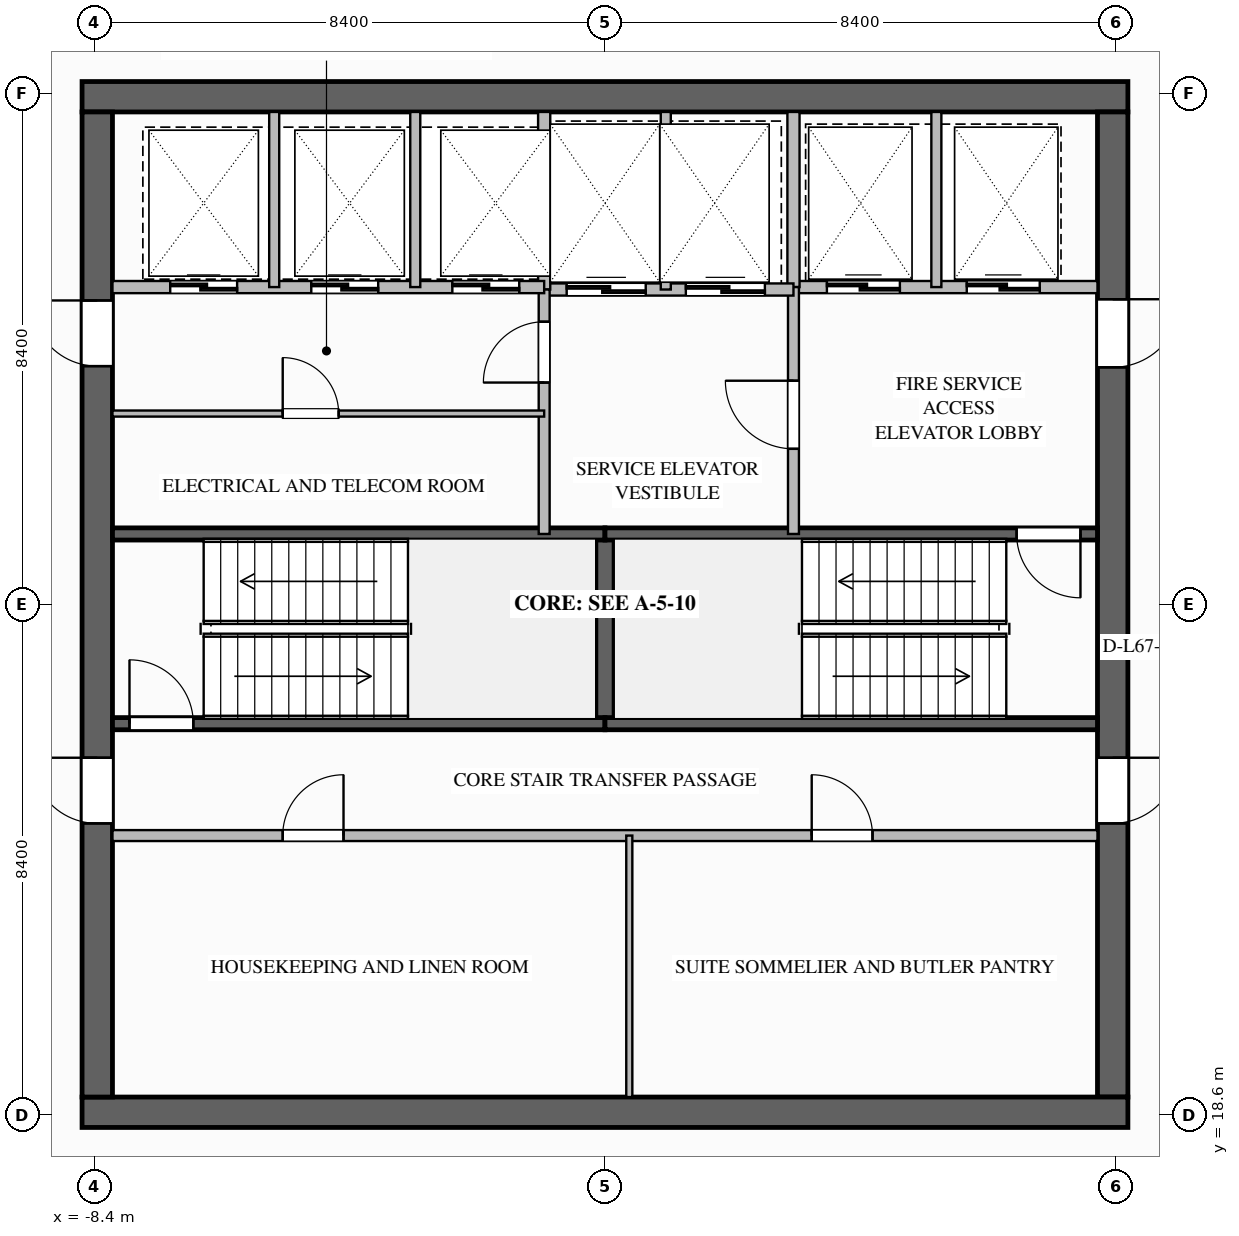
"""IFC4 building model, lengths in metres.
Left out: names, types, materials, properties, quantities, classifications, styles, units other than length and angle.
Written with IfcOpenShell. Run it as: python <this file> out.ifc"""

import sys

from ifc_helpers import new_model, si_unit, direction, frame, frame_2d, origin, place, context, subcontext, project, spatial, rectangle, extrude, element, fill, save


model = new_model("IFC4")
c1 = context("Model", 3, precision=1e-05, world=origin(), true_north=direction((0.0, 1.0)))
c2 = subcontext(c1, "Body", "Model", "MODEL_VIEW")
j1 = project(units=[si_unit("LENGTHUNIT", "METRE"), si_unit("PLANEANGLEUNIT", "RADIAN")], contexts=[c1])
p1 = place(None, origin())
s1 = spatial("IfcSite", under=j1, at=p1, CompositionType="ELEMENT")
p2 = place(p1, origin())
s2 = spatial("IfcBuilding", under=s1, at=p2, CompositionType="ELEMENT")
p3 = place(p2, frame((0.0, 0.0, 255.5)))
s3 = spatial("IfcBuildingStorey", under=s2, at=p3, CompositionType="ELEMENT", Elevation=255.5)
p4 = place(p3, frame((-8.6, 35.35, 0.0), z_axis=(0.0, 0.0, 1.0), x_axis=(1.0, 0.0, 0.0)))
e1 = element("IfcWall", 1, at=p4, inside=s3, PredefinedType="SHEAR", context=c2, shape_type="SweptSolid", body=[
    extrude(rectangle(XDim=17.2, YDim=0.5, at=frame_2d((8.6, 0.0))), origin(), (0.0, 0.0, 1.0), 4.5),
])
p5 = place(p3, frame((8.35, 35.1, 0.0), z_axis=(0.0, 0.0, 1.0), x_axis=(0.0, -1.0, 0.0)))
e2 = element("IfcWall", 2, at=p5, inside=s3, PredefinedType="SHEAR", context=c2, shape_type="SweptSolid", body=[
    extrude(rectangle(XDim=16.2, YDim=0.5, at=frame_2d((8.1, 0.0))), origin(), (0.0, 0.0, 1.0), 4.5),
])
p6 = place(p5, frame((3.08, 0.0, 0.0)))
e3 = element("IfcOpeningElement", 3, at=p6, cuts=e2, PredefinedType="OPENING", context=c2, shape_type="SweptSolid", body=[
    extrude(rectangle(XDim=1.12, YDim=2.1, at=frame_2d((0.56, 1.05))), frame((0.0, 0.26, 0.0), z_axis=(0.0, -1.0, 0.0), x_axis=(1.0, 0.0, 0.0)), (0.0, 0.0, 1.0), 0.52),
])
p7 = place(p5, frame((10.62, 0.0, 0.0)))
e4 = element("IfcOpeningElement", 4, at=p7, cuts=e2, PredefinedType="OPENING", context=c2, shape_type="SweptSolid", body=[
    extrude(rectangle(XDim=1.08, YDim=2.04, at=frame_2d((0.54, 1.02))), frame((0.0, 0.26, 0.0), z_axis=(0.0, -1.0, 0.0), x_axis=(1.0, 0.0, 0.0)), (0.0, 0.0, 1.0), 0.52),
])
p8 = place(p3, frame((8.6, 18.65, 0.0), z_axis=(0.0, 0.0, 1.0), x_axis=(-1.0, 0.0, 0.0)))
e5 = element("IfcWall", 5, at=p8, inside=s3, PredefinedType="SHEAR", context=c2, shape_type="SweptSolid", body=[
    extrude(rectangle(XDim=17.2, YDim=0.5, at=frame_2d((8.6, 0.0))), origin(), (0.0, 0.0, 1.0), 4.5),
])
p9 = place(p3, frame((-8.35, 18.9, 0.0), z_axis=(0.0, 0.0, 1.0), x_axis=(0.0, 1.0, 0.0)))
e6 = element("IfcWall", 6, at=p9, inside=s3, PredefinedType="SHEAR", context=c2, shape_type="SweptSolid", body=[
    extrude(rectangle(XDim=16.2, YDim=0.5, at=frame_2d((8.1, 0.0))), origin(), (0.0, 0.0, 1.0), 4.5),
])
p10 = place(p9, frame((12.02, 0.0, 0.0)))
e7 = element("IfcOpeningElement", 7, at=p10, cuts=e6, PredefinedType="OPENING", context=c2, shape_type="SweptSolid", body=[
    extrude(rectangle(XDim=1.08, YDim=2.04, at=frame_2d((0.54, 1.02))), frame((0.0, 0.26, 0.0), z_axis=(0.0, -1.0, 0.0), x_axis=(1.0, 0.0, 0.0)), (0.0, 0.0, 1.0), 0.52),
])
p11 = place(p9, frame((4.5, 0.0, 0.0)))
e8 = element("IfcOpeningElement", 8, at=p11, cuts=e6, PredefinedType="OPENING", context=c2, shape_type="SweptSolid", body=[
    extrude(rectangle(XDim=1.08, YDim=2.04, at=frame_2d((0.54, 1.02))), frame((0.0, 0.26, 0.0), z_axis=(0.0, -1.0, 0.0), x_axis=(1.0, 0.0, 0.0)), (0.0, 0.0, 1.0), 0.52),
])
p12 = place(p3, frame((0.0, 25.04, 0.0), z_axis=(0.0, 0.0, 1.0), x_axis=(0.0, 1.0, 0.0)))
e9 = element("IfcWall", 9, at=p12, inside=s3, PredefinedType="SOLIDWALL", context=c2, shape_type="SweptSolid", body=[
    extrude(rectangle(XDim=3.12, YDim=0.3, at=frame_2d((1.56, 0.0))), origin(), (0.0, 0.0, 1.0), 4.18),
])
p13 = place(p3, frame((-8.1, 25.04, 0.0), z_axis=(0.0, 0.0, 1.0), x_axis=(1.0, 0.0, 0.0)))
e10 = element("IfcWall", 10, at=p13, inside=s3, PredefinedType="SOLIDWALL", context=c2, shape_type="SweptSolid", body=[
    extrude(rectangle(XDim=8.1, YDim=0.2, at=frame_2d((4.05, 0.0))), origin(), (0.0, 0.0, 1.0), 4.18),
])
p14 = place(p13, frame((0.28, 0.0, 0.0)))
e11 = element("IfcOpeningElement", 11, at=p14, cuts=e10, PredefinedType="OPENING", context=c2, shape_type="SweptSolid", body=[
    extrude(rectangle(XDim=1.05, YDim=2.1, at=frame_2d((0.525, 1.05))), frame((0.0, 0.11, 0.0), z_axis=(0.0, -1.0, 0.0), x_axis=(1.0, 0.0, 0.0)), (0.0, 0.0, 1.0), 0.22),
])
for number, where, z_axis, x_axis in (
    (12, (-8.1, 28.16, 0.0), (0.0, 0.0, 1.0), (1.0, 0.0, 0.0)),
    (13, (0.0, 25.04, 0.0), (0.0, 0.0, 1.0), (1.0, 0.0, 0.0)),
):
    element("IfcWall", number, at=place(p3, frame(where, z_axis=z_axis, x_axis=x_axis)), inside=s3, PredefinedType="SOLIDWALL", context=c2, shape_type="SweptSolid", body=[
        extrude(rectangle(XDim=8.1, YDim=0.2, at=frame_2d((4.05, 0.0))), origin(), (0.0, 0.0, 1.0), 4.18),
    ])
p15 = place(p3, frame((8.1, 28.16, 0.0), z_axis=(0.0, 0.0, 1.0), x_axis=(-1.0, 0.0, 0.0)))
e14 = element("IfcWall", 14, at=p15, inside=s3, PredefinedType="SOLIDWALL", context=c2, shape_type="SweptSolid", body=[
    extrude(rectangle(XDim=8.1, YDim=0.2, at=frame_2d((4.05, 0.0))), origin(), (0.0, 0.0, 1.0), 4.18),
])
p16 = place(p15, frame((0.28, 0.0, 0.0)))
e15 = element("IfcOpeningElement", 15, at=p16, cuts=e14, PredefinedType="OPENING", context=c2, shape_type="SweptSolid", body=[
    extrude(rectangle(XDim=1.05, YDim=2.1, at=frame_2d((0.525, 1.05))), frame((0.0, 0.11, 0.0), z_axis=(0.0, -1.0, 0.0), x_axis=(1.0, 0.0, 0.0)), (0.0, 0.0, 1.0), 0.22),
])
p17 = place(p3, frame((3.1, 32.22, 0.0), z_axis=(0.0, 0.0, 1.0), x_axis=(1.0, 0.0, 0.0)))
e16 = element("IfcWall", 16, at=p17, inside=s3, PredefinedType="SOLIDWALL", context=c2, shape_type="SweptSolid", body=[
    extrude(rectangle(XDim=5.0, YDim=0.2, at=frame_2d((2.5, 0.0))), origin(), (0.0, 0.0, 1.0), 4.18),
])
p18 = place(p17, frame((0.55, 0.0, 0.0)))
e17 = element("IfcOpeningElement", 17, at=p18, cuts=e16, PredefinedType="OPENING", context=c2, shape_type="SweptSolid", body=[
    extrude(rectangle(XDim=1.2, YDim=2.2, at=frame_2d((0.6, 1.1))), frame((0.0, 0.11, 0.0), z_axis=(0.0, -1.0, 0.0), x_axis=(1.0, 0.0, 0.0)), (0.0, 0.0, 1.0), 0.22),
])
p19 = place(p17, frame((2.85, 0.0, 0.0)))
e18 = element("IfcOpeningElement", 18, at=p19, cuts=e16, PredefinedType="OPENING", context=c2, shape_type="SweptSolid", body=[
    extrude(rectangle(XDim=1.2, YDim=2.2, at=frame_2d((0.6, 1.1))), frame((0.0, 0.11, 0.0), z_axis=(0.0, -1.0, 0.0), x_axis=(1.0, 0.0, 0.0)), (0.0, 0.0, 1.0), 0.22),
])
p20 = place(p3, frame((3.1, 32.22, 0.0), z_axis=(0.0, 0.0, 1.0), x_axis=(0.0, 1.0, 0.0)))
e19 = element("IfcWall", 19, at=p20, inside=s3, PredefinedType="SOLIDWALL", context=c2, shape_type="SweptSolid", body=[
    extrude(rectangle(XDim=2.88, YDim=0.2, at=frame_2d((1.44, 0.0))), origin(), (0.0, 0.0, 1.0), 4.18),
])
p21 = place(p3, frame((5.45, 32.22, 0.0), z_axis=(0.0, 0.0, 1.0), x_axis=(0.0, 1.0, 0.0)))
e20 = element("IfcWall", 20, at=p21, inside=s3, PredefinedType="PARTITIONING", context=c2, shape_type="SweptSolid", body=[
    extrude(rectangle(XDim=2.88, YDim=0.165, at=frame_2d((1.44, 0.0))), origin(), (0.0, 0.0, 1.0), 4.18),
])
p22 = place(p3, frame((3.1, 28.16, 0.0), z_axis=(0.0, 0.0, 1.0), x_axis=(0.0, 1.0, 0.0)))
e21 = element("IfcWall", 21, at=p22, inside=s3, PredefinedType="SOLIDWALL", context=c2, shape_type="SweptSolid", body=[
    extrude(rectangle(XDim=4.06, YDim=0.18, at=frame_2d((2.03, 0.0))), origin(), (0.0, 0.0, 1.0), 4.18),
])
p23 = place(p22, frame((1.4, 0.0, 0.0)))
e22 = element("IfcOpeningElement", 22, at=p23, cuts=e21, PredefinedType="OPENING", context=c2, shape_type="SweptSolid", body=[
    extrude(rectangle(XDim=1.12, YDim=2.1, at=frame_2d((0.56, 1.05))), frame((0.0, 0.1, 0.0), z_axis=(0.0, -1.0, 0.0), x_axis=(1.0, 0.0, 0.0)), (0.0, 0.0, 1.0), 0.2),
])
p24 = place(p3, frame((-1.0, 32.18, 0.0), z_axis=(0.0, 0.0, 1.0), x_axis=(1.0, 0.0, 0.0)))
e23 = element("IfcWall", 23, at=p24, inside=s3, PredefinedType="SOLIDWALL", context=c2, shape_type="SweptSolid", body=[
    extrude(rectangle(XDim=4.1, YDim=0.2, at=frame_2d((2.05, 0.0))), origin(), (0.0, 0.0, 1.0), 4.18),
])
p25 = place(p24, frame((0.37, 0.0, 0.0)))
e24 = element("IfcOpeningElement", 24, at=p25, cuts=e23, PredefinedType="OPENING", context=c2, shape_type="SweptSolid", body=[
    extrude(rectangle(XDim=1.3, YDim=2.2, at=frame_2d((0.65, 1.1))), frame((0.0, 0.11, 0.0), z_axis=(0.0, -1.0, 0.0), x_axis=(1.0, 0.0, 0.0)), (0.0, 0.0, 1.0), 0.22),
])
p26 = place(p24, frame((2.33, 0.0, 0.0)))
e25 = element("IfcOpeningElement", 25, at=p26, cuts=e23, PredefinedType="OPENING", context=c2, shape_type="SweptSolid", body=[
    extrude(rectangle(XDim=1.3, YDim=2.2, at=frame_2d((0.65, 1.1))), frame((0.0, 0.11, 0.0), z_axis=(0.0, -1.0, 0.0), x_axis=(1.0, 0.0, 0.0)), (0.0, 0.0, 1.0), 0.22),
])
p27 = place(p3, frame((-1.0, 32.18, 0.0), z_axis=(0.0, 0.0, 1.0), x_axis=(0.0, 1.0, 0.0)))
e26 = element("IfcWall", 26, at=p27, inside=s3, PredefinedType="SOLIDWALL", context=c2, shape_type="SweptSolid", body=[
    extrude(rectangle(XDim=2.92, YDim=0.2, at=frame_2d((1.46, 0.0))), origin(), (0.0, 0.0, 1.0), 4.18),
])
p28 = place(p3, frame((1.0, 32.18, 0.0), z_axis=(0.0, 0.0, 1.0), x_axis=(0.0, 1.0, 0.0)))
e27 = element("IfcWall", 27, at=p28, inside=s3, PredefinedType="PARTITIONING", context=c2, shape_type="SweptSolid", body=[
    extrude(rectangle(XDim=2.92, YDim=0.165, at=frame_2d((1.46, 0.0))), origin(), (0.0, 0.0, 1.0), 4.18),
])
p29 = place(p3, frame((-1.0, 28.16, 0.0), z_axis=(0.0, 0.0, 1.0), x_axis=(0.0, 1.0, 0.0)))
e28 = element("IfcWall", 28, at=p29, inside=s3, PredefinedType="SOLIDWALL", context=c2, shape_type="SweptSolid", body=[
    extrude(rectangle(XDim=4.02, YDim=0.18, at=frame_2d((2.01, 0.0))), origin(), (0.0, 0.0, 1.0), 4.18),
])
p30 = place(p29, frame((2.49, 0.0, 0.0)))
e29 = element("IfcOpeningElement", 29, at=p30, cuts=e28, PredefinedType="OPENING", context=c2, shape_type="SweptSolid", body=[
    extrude(rectangle(XDim=1.0, YDim=2.1, at=frame_2d((0.5, 1.05))), frame((0.0, 0.1, 0.0), z_axis=(0.0, -1.0, 0.0), x_axis=(1.0, 0.0, 0.0)), (0.0, 0.0, 1.0), 0.2),
])
p31 = place(p3, frame((-8.1, 32.22, 0.0), z_axis=(0.0, 0.0, 1.0), x_axis=(1.0, 0.0, 0.0)))
e30 = element("IfcWall", 30, at=p31, inside=s3, PredefinedType="SOLIDWALL", context=c2, shape_type="SweptSolid", body=[
    extrude(rectangle(XDim=7.1, YDim=0.2, at=frame_2d((3.55, 0.0))), origin(), (0.0, 0.0, 1.0), 4.18),
])
p32 = place(p31, frame((0.95, 0.0, 0.0)))
e31 = element("IfcOpeningElement", 31, at=p32, cuts=e30, PredefinedType="OPENING", context=c2, shape_type="SweptSolid", body=[
    extrude(rectangle(XDim=1.1, YDim=2.2, at=frame_2d((0.55, 1.1))), frame((0.0, 0.11, 0.0), z_axis=(0.0, -1.0, 0.0), x_axis=(1.0, 0.0, 0.0)), (0.0, 0.0, 1.0), 0.22),
])
p33 = place(p31, frame((3.27, 0.0, 0.0)))
e32 = element("IfcOpeningElement", 32, at=p33, cuts=e30, PredefinedType="OPENING", context=c2, shape_type="SweptSolid", body=[
    extrude(rectangle(XDim=1.1, YDim=2.2, at=frame_2d((0.55, 1.1))), frame((0.0, 0.11, 0.0), z_axis=(0.0, -1.0, 0.0), x_axis=(1.0, 0.0, 0.0)), (0.0, 0.0, 1.0), 0.22),
])
p34 = place(p31, frame((5.59, 0.0, 0.0)))
e33 = element("IfcOpeningElement", 33, at=p34, cuts=e30, PredefinedType="OPENING", context=c2, shape_type="SweptSolid", body=[
    extrude(rectangle(XDim=1.1, YDim=2.2, at=frame_2d((0.55, 1.1))), frame((0.0, 0.11, 0.0), z_axis=(0.0, -1.0, 0.0), x_axis=(1.0, 0.0, 0.0)), (0.0, 0.0, 1.0), 0.22),
])
for number, where, z_axis, x_axis in (
    (34, (-5.44, 32.22, 0.0), (0.0, 0.0, 1.0), (0.0, 1.0, 0.0)),
    (35, (-3.12, 32.22, 0.0), (0.0, 0.0, 1.0), (0.0, 1.0, 0.0)),
):
    element("IfcWall", number, at=place(p3, frame(where, z_axis=z_axis, x_axis=x_axis)), inside=s3, PredefinedType="PARTITIONING", context=c2, shape_type="SweptSolid", body=[
        extrude(rectangle(XDim=2.88, YDim=0.165, at=frame_2d((1.44, 0.0))), origin(), (0.0, 0.0, 1.0), 4.18),
    ])
p35 = place(p3, frame((-8.1, 30.14, 0.0), z_axis=(0.0, 0.0, 1.0), x_axis=(1.0, 0.0, 0.0)))
e36 = element("IfcWall", 36, at=p35, inside=s3, PredefinedType="PARTITIONING", context=c2, shape_type="SweptSolid", body=[
    extrude(rectangle(XDim=7.1, YDim=0.1, at=frame_2d((3.55, 0.0))), origin(), (0.0, 0.0, 1.0), 4.18),
])
p36 = place(p35, frame((2.8, 0.0, 0.0)))
e37 = element("IfcOpeningElement", 37, at=p36, cuts=e36, PredefinedType="OPENING", context=c2, shape_type="SweptSolid", body=[
    extrude(rectangle(XDim=0.92, YDim=2.1, at=frame_2d((0.46, 1.05))), frame((0.0, 0.06, 0.0), z_axis=(0.0, -1.0, 0.0), x_axis=(1.0, 0.0, 0.0)), (0.0, 0.0, 1.0), 0.12),
])
p37 = place(p3, frame((-8.1, 23.2, 0.0), z_axis=(0.0, 0.0, 1.0), x_axis=(1.0, 0.0, 0.0)))
e38 = element("IfcWall", 38, at=p37, inside=s3, PredefinedType="SOLIDWALL", context=c2, shape_type="SweptSolid", body=[
    extrude(rectangle(XDim=16.2, YDim=0.18, at=frame_2d((8.1, 0.0))), origin(), (0.0, 0.0, 1.0), 4.18),
])
p38 = place(p37, frame((2.8, 0.0, 0.0)))
e39 = element("IfcOpeningElement", 39, at=p38, cuts=e38, PredefinedType="OPENING", context=c2, shape_type="SweptSolid", body=[
    extrude(rectangle(XDim=1.0, YDim=2.1, at=frame_2d((0.5, 1.05))), frame((0.0, 0.1, 0.0), z_axis=(0.0, -1.0, 0.0), x_axis=(1.0, 0.0, 0.0)), (0.0, 0.0, 1.0), 0.2),
])
p39 = place(p37, frame((11.5, 0.0, 0.0)))
e40 = element("IfcOpeningElement", 40, at=p39, cuts=e38, PredefinedType="OPENING", context=c2, shape_type="SweptSolid", body=[
    extrude(rectangle(XDim=1.0, YDim=2.1, at=frame_2d((0.5, 1.05))), frame((0.0, 0.1, 0.0), z_axis=(0.0, -1.0, 0.0), x_axis=(1.0, 0.0, 0.0)), (0.0, 0.0, 1.0), 0.2),
])
p40 = place(p3, frame((0.4, 18.9, 0.0), z_axis=(0.0, 0.0, 1.0), x_axis=(0.0, 1.0, 0.0)))
e41 = element("IfcWall", 41, at=p40, inside=s3, PredefinedType="PARTITIONING", context=c2, shape_type="SweptSolid", body=[
    extrude(rectangle(XDim=4.3, YDim=0.1, at=frame_2d((2.15, 0.0))), origin(), (0.0, 0.0, 1.0), 4.18),
])
p41 = place(p14, origin())
e42 = element("IfcDoor", 42, at=p41, inside=s3, OperationType="SINGLE_SWING_LEFT", PredefinedType="DOOR", context=c2, shape_type="SweptSolid", body=[
    extrude(rectangle(XDim=1.05, YDim=2.1, at=frame_2d((0.525, 1.05))), frame((0.0, 0.025, 0.0), z_axis=(0.0, -1.0, 0.0), x_axis=(1.0, 0.0, 0.0)), (0.0, 0.0, 1.0), 0.05),
])
fill(e11, e42)
p42 = place(p16, origin())
e43 = element("IfcDoor", 43, at=p42, inside=s3, OperationType="SINGLE_SWING_LEFT", PredefinedType="DOOR", context=c2, shape_type="SweptSolid", body=[
    extrude(rectangle(XDim=1.05, YDim=2.1, at=frame_2d((0.525, 1.05))), frame((0.0, 0.025, 0.0), z_axis=(0.0, -1.0, 0.0), x_axis=(1.0, 0.0, 0.0)), (0.0, 0.0, 1.0), 0.05),
])
fill(e15, e43)
p43 = place(p18, origin())
e44 = element("IfcDoor", 44, at=p43, inside=s3, OperationType="SLIDING_TO_LEFT", PredefinedType="DOOR", context=c2, shape_type="SweptSolid", body=[
    extrude(rectangle(XDim=1.2, YDim=2.2, at=frame_2d((0.6, 1.1))), frame((0.0, 0.025, 0.0), z_axis=(0.0, -1.0, 0.0), x_axis=(1.0, 0.0, 0.0)), (0.0, 0.0, 1.0), 0.05),
])
fill(e17, e44)
p44 = place(p19, origin())
e45 = element("IfcDoor", 45, at=p44, inside=s3, OperationType="SLIDING_TO_LEFT", PredefinedType="DOOR", context=c2, shape_type="SweptSolid", body=[
    extrude(rectangle(XDim=1.2, YDim=2.2, at=frame_2d((0.6, 1.1))), frame((0.0, 0.025, 0.0), z_axis=(0.0, -1.0, 0.0), x_axis=(1.0, 0.0, 0.0)), (0.0, 0.0, 1.0), 0.05),
])
fill(e18, e45)
p45 = place(p23, origin())
e46 = element("IfcDoor", 46, at=p45, inside=s3, OperationType="SINGLE_SWING_RIGHT", PredefinedType="DOOR", context=c2, shape_type="SweptSolid", body=[
    extrude(rectangle(XDim=1.12, YDim=2.1, at=frame_2d((0.56, 1.05))), frame((0.0, 0.025, 0.0), z_axis=(0.0, -1.0, 0.0), x_axis=(1.0, 0.0, 0.0)), (0.0, 0.0, 1.0), 0.05),
])
fill(e22, e46)
p46 = place(p6, origin())
e47 = element("IfcDoor", 47, at=p46, inside=s3, OperationType="SINGLE_SWING_LEFT", PredefinedType="DOOR", context=c2, shape_type="SweptSolid", body=[
    extrude(rectangle(XDim=1.12, YDim=2.1, at=frame_2d((0.56, 1.05))), frame((0.0, 0.025, 0.0), z_axis=(0.0, -1.0, 0.0), x_axis=(1.0, 0.0, 0.0)), (0.0, 0.0, 1.0), 0.05),
])
fill(e3, e47)
p47 = place(p25, origin())
e48 = element("IfcDoor", 48, at=p47, inside=s3, OperationType="SLIDING_TO_LEFT", PredefinedType="DOOR", context=c2, shape_type="SweptSolid", body=[
    extrude(rectangle(XDim=1.3, YDim=2.2, at=frame_2d((0.65, 1.1))), frame((0.0, 0.025, 0.0), z_axis=(0.0, -1.0, 0.0), x_axis=(1.0, 0.0, 0.0)), (0.0, 0.0, 1.0), 0.05),
])
fill(e24, e48)
p48 = place(p26, origin())
e49 = element("IfcDoor", 49, at=p48, inside=s3, OperationType="SLIDING_TO_LEFT", PredefinedType="DOOR", context=c2, shape_type="SweptSolid", body=[
    extrude(rectangle(XDim=1.3, YDim=2.2, at=frame_2d((0.65, 1.1))), frame((0.0, 0.025, 0.0), z_axis=(0.0, -1.0, 0.0), x_axis=(1.0, 0.0, 0.0)), (0.0, 0.0, 1.0), 0.05),
])
fill(e25, e49)
p49 = place(p30, origin())
e50 = element("IfcDoor", 50, at=p49, inside=s3, OperationType="SINGLE_SWING_LEFT", PredefinedType="DOOR", context=c2, shape_type="SweptSolid", body=[
    extrude(rectangle(XDim=1.0, YDim=2.1, at=frame_2d((0.5, 1.05))), frame((0.0, 0.025, 0.0), z_axis=(0.0, -1.0, 0.0), x_axis=(1.0, 0.0, 0.0)), (0.0, 0.0, 1.0), 0.05),
])
fill(e29, e50)
p50 = place(p32, origin())
e51 = element("IfcDoor", 51, at=p50, inside=s3, OperationType="SLIDING_TO_LEFT", PredefinedType="DOOR", context=c2, shape_type="SweptSolid", body=[
    extrude(rectangle(XDim=1.1, YDim=2.2, at=frame_2d((0.55, 1.1))), frame((0.0, 0.025, 0.0), z_axis=(0.0, -1.0, 0.0), x_axis=(1.0, 0.0, 0.0)), (0.0, 0.0, 1.0), 0.05),
])
fill(e31, e51)
p51 = place(p33, origin())
e52 = element("IfcDoor", 52, at=p51, inside=s3, OperationType="SLIDING_TO_LEFT", PredefinedType="DOOR", context=c2, shape_type="SweptSolid", body=[
    extrude(rectangle(XDim=1.1, YDim=2.2, at=frame_2d((0.55, 1.1))), frame((0.0, 0.025, 0.0), z_axis=(0.0, -1.0, 0.0), x_axis=(1.0, 0.0, 0.0)), (0.0, 0.0, 1.0), 0.05),
])
fill(e32, e52)
p52 = place(p34, origin())
e53 = element("IfcDoor", 53, at=p52, inside=s3, OperationType="SLIDING_TO_LEFT", PredefinedType="DOOR", context=c2, shape_type="SweptSolid", body=[
    extrude(rectangle(XDim=1.1, YDim=2.2, at=frame_2d((0.55, 1.1))), frame((0.0, 0.025, 0.0), z_axis=(0.0, -1.0, 0.0), x_axis=(1.0, 0.0, 0.0)), (0.0, 0.0, 1.0), 0.05),
])
fill(e33, e53)
p53 = place(p10, origin())
e54 = element("IfcDoor", 54, at=p53, inside=s3, OperationType="SINGLE_SWING_RIGHT", PredefinedType="DOOR", context=c2, shape_type="SweptSolid", body=[
    extrude(rectangle(XDim=1.08, YDim=2.04, at=frame_2d((0.54, 1.02))), frame((0.0, 0.025, 0.0), z_axis=(0.0, -1.0, 0.0), x_axis=(1.0, 0.0, 0.0)), (0.0, 0.0, 1.0), 0.05),
])
fill(e7, e54)
p54 = place(p36, origin())
e55 = element("IfcDoor", 55, at=p54, inside=s3, OperationType="SINGLE_SWING_LEFT", PredefinedType="DOOR", context=c2, shape_type="SweptSolid", body=[
    extrude(rectangle(XDim=0.92, YDim=2.1, at=frame_2d((0.46, 1.05))), frame((0.0, 0.025, 0.0), z_axis=(0.0, -1.0, 0.0), x_axis=(1.0, 0.0, 0.0)), (0.0, 0.0, 1.0), 0.05),
])
fill(e37, e55)
p55 = place(p11, origin())
e56 = element("IfcDoor", 56, at=p55, inside=s3, OperationType="SINGLE_SWING_RIGHT", PredefinedType="DOOR", context=c2, shape_type="SweptSolid", body=[
    extrude(rectangle(XDim=1.08, YDim=2.04, at=frame_2d((0.54, 1.02))), frame((0.0, 0.025, 0.0), z_axis=(0.0, -1.0, 0.0), x_axis=(1.0, 0.0, 0.0)), (0.0, 0.0, 1.0), 0.05),
])
fill(e8, e56)
p56 = place(p7, origin())
e57 = element("IfcDoor", 57, at=p56, inside=s3, OperationType="SINGLE_SWING_LEFT", PredefinedType="DOOR", context=c2, shape_type="SweptSolid", body=[
    extrude(rectangle(XDim=1.08, YDim=2.04, at=frame_2d((0.54, 1.02))), frame((0.0, 0.025, 0.0), z_axis=(0.0, -1.0, 0.0), x_axis=(1.0, 0.0, 0.0)), (0.0, 0.0, 1.0), 0.05),
])
fill(e4, e57)
p57 = place(p38, origin())
e58 = element("IfcDoor", 58, at=p57, inside=s3, OperationType="SINGLE_SWING_RIGHT", PredefinedType="DOOR", context=c2, shape_type="SweptSolid", body=[
    extrude(rectangle(XDim=1.0, YDim=2.1, at=frame_2d((0.5, 1.05))), frame((0.0, 0.025, 0.0), z_axis=(0.0, -1.0, 0.0), x_axis=(1.0, 0.0, 0.0)), (0.0, 0.0, 1.0), 0.05),
])
fill(e39, e58)
p58 = place(p39, origin())
e59 = element("IfcDoor", 59, at=p58, inside=s3, OperationType="SINGLE_SWING_LEFT", PredefinedType="DOOR", context=c2, shape_type="SweptSolid", body=[
    extrude(rectangle(XDim=1.0, YDim=2.1, at=frame_2d((0.5, 1.05))), frame((0.0, 0.025, 0.0), z_axis=(0.0, -1.0, 0.0), x_axis=(1.0, 0.0, 0.0)), (0.0, 0.0, 1.0), 0.05),
])
fill(e40, e59)
save(model, sys.argv[1])
